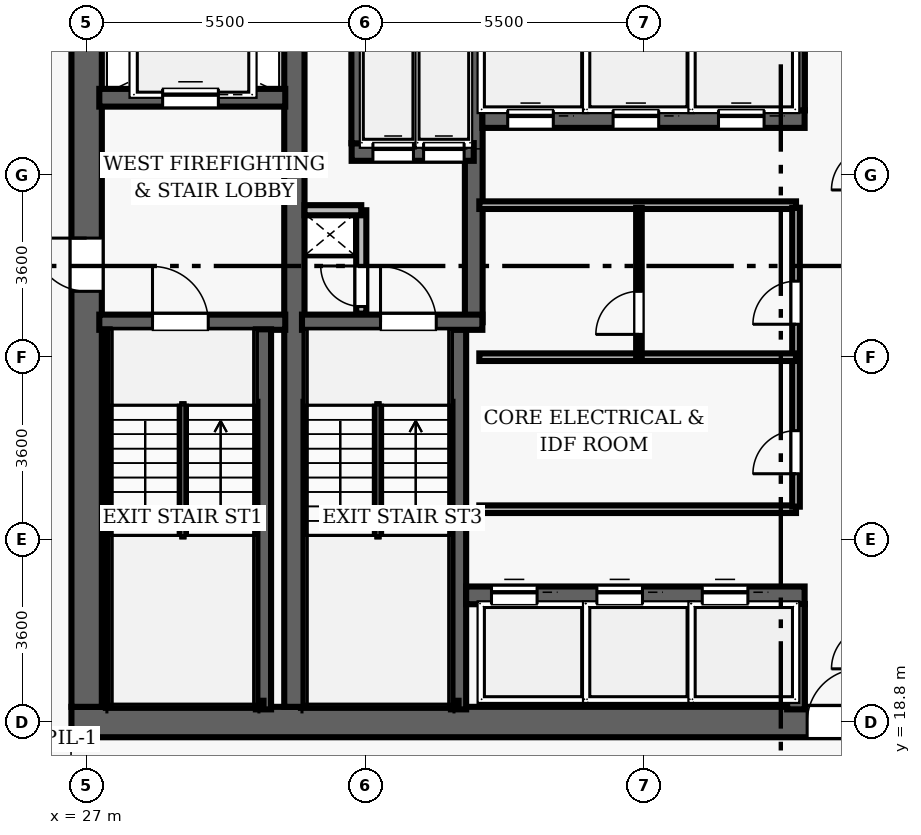
"""IFC4 building model, lengths in metres.
Left out: names, types, materials, properties, quantities, classifications, styles, units other than length and angle.
Written with IfcOpenShell. Run it as: python <this file> out.ifc"""

import sys

from ifc_helpers import new_model, si_unit, direction, frame, frame_2d, origin, place, context, subcontext, project, spatial, rectangle, extrude, element, fill, save


model = new_model("IFC4")
c1 = context("Model", 3, precision=1e-05, world=origin(), true_north=direction((0.0, 1.0)))
c2 = subcontext(c1, "Body", "Model", "MODEL_VIEW")
j1 = project(units=[si_unit("LENGTHUNIT", "METRE"), si_unit("PLANEANGLEUNIT", "RADIAN")], contexts=[c1])
p1 = place(None, origin())
s1 = spatial("IfcSite", under=j1, at=p1, CompositionType="ELEMENT")
p2 = place(p1, origin())
s2 = spatial("IfcBuilding", under=s1, at=p2, CompositionType="ELEMENT")
p3 = place(p2, origin())
s3 = spatial("IfcBuildingStorey", under=s2, at=p3, CompositionType="ELEMENT", Elevation=0.0)
p4 = place(p3, frame((26.7, 18.8, 0.0), z_axis=(0.0, 0.0, 1.0), x_axis=(1.0, 0.0, 0.0)))
e1 = element("IfcWall", 1, at=p4, inside=s3, PredefinedType="SHEAR", context=c2, shape_type="SweptSolid", body=[
    extrude(rectangle(XDim=22.6, YDim=0.6, at=frame_2d((11.3, 0.0))), origin(), (0.0, 0.0, 1.0), 6.6),
])
p5 = place(p4, frame((14.52, 0.0, 0.0)))
e2 = element("IfcOpeningElement", 2, at=p5, cuts=e1, PredefinedType="OPENING", context=c2, shape_type="SweptSolid", body=[
    extrude(rectangle(XDim=1.05, YDim=2.15, at=frame_2d((0.525, 1.075))), frame((0.0, 0.31, 0.0), z_axis=(0.0, -1.0, 0.0), x_axis=(1.0, 0.0, 0.0)), (0.0, 0.0, 1.0), 0.62),
])
p6 = place(p3, frame((27.0, 19.1, 0.0), z_axis=(0.0, 0.0, 1.0), x_axis=(0.0, 1.0, 0.0)))
e3 = element("IfcWall", 3, at=p6, inside=s3, PredefinedType="SHEAR", context=c2, shape_type="SweptSolid", body=[
    extrude(rectangle(XDim=13.8, YDim=0.6, at=frame_2d((6.9, 0.0))), origin(), (0.0, 0.0, 1.0), 6.6),
])
p7 = place(p6, frame((8.2, 0.0, 0.0)))
e4 = element("IfcOpeningElement", 4, at=p7, cuts=e3, PredefinedType="OPENING", context=c2, shape_type="SweptSolid", body=[
    extrude(rectangle(XDim=1.05, YDim=2.15, at=frame_2d((0.525, 1.075))), frame((0.0, 0.31, 0.0), z_axis=(0.0, -1.0, 0.0), x_axis=(1.0, 0.0, 0.0)), (0.0, 0.0, 1.0), 0.62),
])
p8 = place(p3, frame((31.1, 19.1, 0.0), z_axis=(0.0, 0.0, 1.0), x_axis=(0.0, 1.0, 0.0)))
e5 = element("IfcWall", 5, at=p8, inside=s3, PredefinedType="SHEAR", context=c2, shape_type="SweptSolid", body=[
    extrude(rectangle(XDim=13.8, YDim=0.4, at=frame_2d((6.9, 0.0))), origin(), (0.0, 0.0, 1.0), 6.6),
])
p9 = place(p3, frame((27.25, 26.69, 0.0), z_axis=(0.0, 0.0, 1.0), x_axis=(1.0, 0.0, 0.0)))
e6 = element("IfcWall", 6, at=p9, inside=s3, PredefinedType="SHEAR", context=c2, shape_type="SweptSolid", body=[
    extrude(rectangle(XDim=3.67, YDim=0.3, at=frame_2d((1.835, 0.0))), origin(), (0.0, 0.0, 1.0), 6.6),
])
p10 = place(p9, frame((1.05, 0.0, 0.0)))
e7 = element("IfcOpeningElement", 7, at=p10, cuts=e6, PredefinedType="OPENING", context=c2, shape_type="SweptSolid", body=[
    extrude(rectangle(XDim=1.1, YDim=2.15, at=frame_2d((0.55, 1.075))), frame((0.0, 0.16, 0.0), z_axis=(0.0, -1.0, 0.0), x_axis=(1.0, 0.0, 0.0)), (0.0, 0.0, 1.0), 0.32),
])
p11 = place(p3, frame((30.49, 19.05, 0.0), z_axis=(0.0, 0.0, 1.0), x_axis=(0.0, 1.0, 0.0)))
e8 = element("IfcWall", 8, at=p11, inside=s3, PredefinedType="SHEAR", context=c2, shape_type="SweptSolid", body=[
    extrude(rectangle(XDim=7.5, YDim=0.3, at=frame_2d((3.75, 0.0))), origin(), (0.0, 0.0, 1.0), 6.6),
])
p12 = place(p3, frame((27.395, 19.1, 0.0), z_axis=(0.0, 0.0, 1.0), x_axis=(0.0, 1.0, 0.0)))
e9 = element("IfcWall", 9, at=p12, inside=s3, PredefinedType="SHEAR", context=c2, shape_type="SweptSolid", body=[
    extrude(rectangle(XDim=7.45, YDim=0.12, at=frame_2d((3.725, 0.0))), origin(), (0.0, 0.0, 1.0), 6.6),
])
p13 = place(p3, frame((27.395, 19.16, 0.0), z_axis=(0.0, 0.0, 1.0), x_axis=(1.0, 0.0, 0.0)))
e10 = element("IfcWall", 10, at=p13, inside=s3, PredefinedType="SHEAR", context=c2, shape_type="SweptSolid", body=[
    extrude(rectangle(XDim=3.095, YDim=0.12, at=frame_2d((1.547, 0.0))), origin(), (0.0, 0.0, 1.0), 6.6),
])
p14 = place(p3, frame((27.25, 31.12, 0.0), z_axis=(0.0, 0.0, 1.0), x_axis=(1.0, 0.0, 0.0)))
e11 = element("IfcWall", 11, at=p14, inside=s3, PredefinedType="SHEAR", context=c2, shape_type="SweptSolid", body=[
    extrude(rectangle(XDim=3.67, YDim=0.35, at=frame_2d((1.835, 0.0))), origin(), (0.0, 0.0, 1.0), 5.31),
])
p15 = place(p14, frame((1.25, 0.0, 0.0)))
e12 = element("IfcOpeningElement", 12, at=p15, cuts=e11, PredefinedType="OPENING", context=c2, shape_type="SweptSolid", body=[
    extrude(rectangle(XDim=1.1, YDim=2.15, at=frame_2d((0.55, 1.075))), frame((0.0, 0.185, 0.0), z_axis=(0.0, -1.0, 0.0), x_axis=(1.0, 0.0, 0.0)), (0.0, 0.0, 1.0), 0.37),
])
p16 = place(p3, frame((34.34, 19.05, 0.0), z_axis=(0.0, 0.0, 1.0), x_axis=(0.0, 1.0, 0.0)))
e13 = element("IfcWall", 13, at=p16, inside=s3, PredefinedType="SHEAR", context=c2, shape_type="SweptSolid", body=[
    extrude(rectangle(XDim=7.5, YDim=0.3, at=frame_2d((3.75, 0.0))), origin(), (0.0, 0.0, 1.0), 6.6),
])
p17 = place(p3, frame((34.64, 26.69, 0.0), z_axis=(0.0, 0.0, 1.0), x_axis=(0.0, 1.0, 0.0)))
e14 = element("IfcWall", 14, at=p17, inside=s3, PredefinedType="SHEAR", context=c2, shape_type="SweptSolid", body=[
    extrude(rectangle(XDim=6.26, YDim=0.35, at=frame_2d((3.13, 0.0))), origin(), (0.0, 0.0, 1.0), 6.6),
])
p18 = place(p3, frame((31.25, 26.69, 0.0), z_axis=(0.0, 0.0, 1.0), x_axis=(1.0, 0.0, 0.0)))
e15 = element("IfcWall", 15, at=p18, inside=s3, PredefinedType="SHEAR", context=c2, shape_type="SweptSolid", body=[
    extrude(rectangle(XDim=3.56, YDim=0.3, at=frame_2d((1.78, 0.0))), origin(), (0.0, 0.0, 1.0), 6.6),
])
p19 = place(p18, frame((1.55, 0.0, 0.0)))
e16 = element("IfcOpeningElement", 16, at=p19, cuts=e15, PredefinedType="OPENING", context=c2, shape_type="SweptSolid", body=[
    extrude(rectangle(XDim=1.1, YDim=2.15, at=frame_2d((0.55, 1.075))), frame((0.0, 0.16, 0.0), z_axis=(0.0, -1.0, 0.0), x_axis=(1.0, 0.0, 0.0)), (0.0, 0.0, 1.0), 0.32),
])
p20 = place(p3, frame((31.3, 19.16, 0.0), z_axis=(0.0, 0.0, 1.0), x_axis=(1.0, 0.0, 0.0)))
e17 = element("IfcWall", 17, at=p20, inside=s3, PredefinedType="SHEAR", context=c2, shape_type="SweptSolid", body=[
    extrude(rectangle(XDim=3.04, YDim=0.12, at=frame_2d((1.52, 0.0))), origin(), (0.0, 0.0, 1.0), 6.6),
])
p21 = place(p3, frame((32.23, 30.05, 0.0), z_axis=(0.0, 0.0, 1.0), x_axis=(1.0, 0.0, 0.0)))
e18 = element("IfcWall", 18, at=p21, inside=s3, PredefinedType="SHEAR", context=c2, shape_type="SweptSolid", body=[
    extrude(rectangle(XDim=2.41, YDim=0.35, at=frame_2d((1.205, 0.0))), origin(), (0.0, 0.0, 1.0), 5.31),
])
p22 = place(p21, frame((0.42, 0.0, 0.0)))
e19 = element("IfcOpeningElement", 19, at=p22, cuts=e18, PredefinedType="OPENING", context=c2, shape_type="SweptSolid", body=[
    extrude(rectangle(XDim=0.8, YDim=2.15, at=frame_2d((0.4, 1.075))), frame((0.0, 0.185, 0.0), z_axis=(0.0, -1.0, 0.0), x_axis=(1.0, 0.0, 0.0)), (0.0, 0.0, 1.0), 0.37),
])
p23 = place(p21, frame((1.42, 0.0, 0.0)))
e20 = element("IfcOpeningElement", 20, at=p23, cuts=e18, PredefinedType="OPENING", context=c2, shape_type="SweptSolid", body=[
    extrude(rectangle(XDim=0.8, YDim=2.15, at=frame_2d((0.4, 1.075))), frame((0.0, 0.185, 0.0), z_axis=(0.0, -1.0, 0.0), x_axis=(1.0, 0.0, 0.0)), (0.0, 0.0, 1.0), 0.37),
])
p24 = place(p3, frame((32.4, 30.22, 0.0), z_axis=(0.0, 0.0, 1.0), x_axis=(0.0, 1.0, 0.0)))
e21 = element("IfcWall", 21, at=p24, inside=s3, PredefinedType="SHEAR", context=c2, shape_type="SweptSolid", body=[
    extrude(rectangle(XDim=2.73, YDim=0.35, at=frame_2d((1.365, 0.0))), origin(), (0.0, 0.0, 1.0), 5.31),
])
p25 = place(p3, frame((32.42, 26.86, 0.0), z_axis=(0.0, 0.0, 1.0), x_axis=(0.0, 1.0, 0.0)))
e22 = element("IfcWall", 22, at=p25, inside=s3, PredefinedType="PARTITIONING", context=c2, shape_type="SweptSolid", body=[
    extrude(rectangle(XDim=2.04, YDim=0.2, at=frame_2d((1.02, 0.0))), origin(), (0.0, 0.0, 1.0), 5.31),
])
p26 = place(p25, frame((0.14, 0.0, 0.0)))
e23 = element("IfcOpeningElement", 23, at=p26, cuts=e22, PredefinedType="OPENING", context=c2, shape_type="SweptSolid", body=[
    extrude(rectangle(XDim=0.8, YDim=2.05, at=frame_2d((0.4, 1.025))), frame((0.0, 0.11, 0.0), z_axis=(0.0, -1.0, 0.0), x_axis=(1.0, 0.0, 0.0)), (0.0, 0.0, 1.0), 0.22),
])
p27 = place(p3, frame((31.3, 28.9, 0.0), z_axis=(0.0, 0.0, 1.0), x_axis=(1.0, 0.0, 0.0)))
e24 = element("IfcWall", 24, at=p27, inside=s3, PredefinedType="PARTITIONING", context=c2, shape_type="SweptSolid", body=[
    extrude(rectangle(XDim=1.12, YDim=0.2, at=frame_2d((0.56, 0.0))), origin(), (0.0, 0.0, 1.0), 5.31),
])
p28 = place(p3, frame((34.81, 30.7, 0.0), z_axis=(0.0, 0.0, 1.0), x_axis=(1.0, 0.0, 0.0)))
e25 = element("IfcWall", 25, at=p28, inside=s3, PredefinedType="SHEAR", context=c2, shape_type="SweptSolid", body=[
    extrude(rectangle(XDim=6.36, YDim=0.35, at=frame_2d((3.18, 0.0))), origin(), (0.0, 0.0, 1.0), 5.31),
])
p29 = place(p28, frame((0.5, 0.0, 0.0)))
e26 = element("IfcOpeningElement", 26, at=p29, cuts=e25, PredefinedType="OPENING", context=c2, shape_type="SweptSolid", body=[
    extrude(rectangle(XDim=0.9, YDim=2.15, at=frame_2d((0.45, 1.075))), frame((0.0, 0.185, 0.0), z_axis=(0.0, -1.0, 0.0), x_axis=(1.0, 0.0, 0.0)), (0.0, 0.0, 1.0), 0.37),
])
p30 = place(p28, frame((2.58, 0.0, 0.0)))
e27 = element("IfcOpeningElement", 27, at=p30, cuts=e25, PredefinedType="OPENING", context=c2, shape_type="SweptSolid", body=[
    extrude(rectangle(XDim=0.9, YDim=2.15, at=frame_2d((0.45, 1.075))), frame((0.0, 0.185, 0.0), z_axis=(0.0, -1.0, 0.0), x_axis=(1.0, 0.0, 0.0)), (0.0, 0.0, 1.0), 0.37),
])
p31 = place(p28, frame((4.66, 0.0, 0.0)))
e28 = element("IfcOpeningElement", 28, at=p31, cuts=e25, PredefinedType="OPENING", context=c2, shape_type="SweptSolid", body=[
    extrude(rectangle(XDim=0.9, YDim=2.15, at=frame_2d((0.45, 1.075))), frame((0.0, 0.185, 0.0), z_axis=(0.0, -1.0, 0.0), x_axis=(1.0, 0.0, 0.0)), (0.0, 0.0, 1.0), 0.37),
])
p32 = place(p3, frame((41.0, 30.87, 0.0), z_axis=(0.0, 0.0, 1.0), x_axis=(0.0, 1.0, 0.0)))
e29 = element("IfcWall", 29, at=p32, inside=s3, PredefinedType="SHEAR", context=c2, shape_type="SweptSolid", body=[
    extrude(rectangle(XDim=2.08, YDim=0.35, at=frame_2d((1.04, 0.0))), origin(), (0.0, 0.0, 1.0), 5.31),
])
p33 = place(p3, frame((34.49, 21.3, 0.0), z_axis=(0.0, 0.0, 1.0), x_axis=(1.0, 0.0, 0.0)))
e30 = element("IfcWall", 30, at=p33, inside=s3, PredefinedType="SHEAR", context=c2, shape_type="SweptSolid", body=[
    extrude(rectangle(XDim=6.68, YDim=0.35, at=frame_2d((3.34, 0.0))), origin(), (0.0, 0.0, 1.0), 5.31),
])
p34 = place(p33, frame((0.5, 0.0, 0.0)))
e31 = element("IfcOpeningElement", 31, at=p34, cuts=e30, PredefinedType="OPENING", context=c2, shape_type="SweptSolid", body=[
    extrude(rectangle(XDim=0.9, YDim=2.15, at=frame_2d((0.45, 1.075))), frame((0.0, 0.185, 0.0), z_axis=(0.0, -1.0, 0.0), x_axis=(1.0, 0.0, 0.0)), (0.0, 0.0, 1.0), 0.37),
])
p35 = place(p33, frame((2.58, 0.0, 0.0)))
e32 = element("IfcOpeningElement", 32, at=p35, cuts=e30, PredefinedType="OPENING", context=c2, shape_type="SweptSolid", body=[
    extrude(rectangle(XDim=0.9, YDim=2.15, at=frame_2d((0.45, 1.075))), frame((0.0, 0.185, 0.0), z_axis=(0.0, -1.0, 0.0), x_axis=(1.0, 0.0, 0.0)), (0.0, 0.0, 1.0), 0.37),
])
p36 = place(p33, frame((4.66, 0.0, 0.0)))
e33 = element("IfcOpeningElement", 33, at=p36, cuts=e30, PredefinedType="OPENING", context=c2, shape_type="SweptSolid", body=[
    extrude(rectangle(XDim=0.9, YDim=2.15, at=frame_2d((0.45, 1.075))), frame((0.0, 0.185, 0.0), z_axis=(0.0, -1.0, 0.0), x_axis=(1.0, 0.0, 0.0)), (0.0, 0.0, 1.0), 0.37),
])
p37 = place(p3, frame((41.0, 19.05, 0.0), z_axis=(0.0, 0.0, 1.0), x_axis=(0.0, 1.0, 0.0)))
e34 = element("IfcWall", 34, at=p37, inside=s3, PredefinedType="SHEAR", context=c2, shape_type="SweptSolid", body=[
    extrude(rectangle(XDim=2.08, YDim=0.35, at=frame_2d((1.04, 0.0))), origin(), (0.0, 0.0, 1.0), 5.31),
])
for number, where, z_axis, x_axis in (
    (35, (34.75, 29.0, 0.0), (0.0, 0.0, 1.0), (1.0, 0.0, 0.0)),
    (36, (34.75, 23.0, 0.0), (0.0, 0.0, 1.0), (1.0, 0.0, 0.0)),
):
    element("IfcWall", number, at=place(p3, frame(where, z_axis=z_axis, x_axis=x_axis)), inside=s3, PredefinedType="PARTITIONING", context=c2, shape_type="SweptSolid", body=[
        extrude(rectangle(XDim=6.25, YDim=0.15, at=frame_2d((3.125, 0.0))), origin(), (0.0, 0.0, 1.0), 5.31),
    ])
p38 = place(p3, frame((41.0, 23.05, 0.0), z_axis=(0.0, 0.0, 1.0), x_axis=(0.0, 1.0, 0.0)))
e37 = element("IfcWall", 37, at=p38, inside=s3, PredefinedType="PARTITIONING", context=c2, shape_type="SweptSolid", body=[
    extrude(rectangle(XDim=5.9, YDim=0.15, at=frame_2d((2.95, 0.0))), origin(), (0.0, 0.0, 1.0), 5.31),
])
p39 = place(p38, frame((0.65, 0.0, 0.0)))
e38 = element("IfcOpeningElement", 38, at=p39, cuts=e37, PredefinedType="OPENING", context=c2, shape_type="SweptSolid", body=[
    extrude(rectangle(XDim=0.85, YDim=2.1, at=frame_2d((0.425, 1.05))), frame((0.0, 0.085, 0.0), z_axis=(0.0, -1.0, 0.0), x_axis=(1.0, 0.0, 0.0)), (0.0, 0.0, 1.0), 0.17),
])
p40 = place(p38, frame((3.6, 0.0, 0.0)))
e39 = element("IfcOpeningElement", 39, at=p40, cuts=e37, PredefinedType="OPENING", context=c2, shape_type="SweptSolid", body=[
    extrude(rectangle(XDim=0.85, YDim=2.1, at=frame_2d((0.425, 1.05))), frame((0.0, 0.085, 0.0), z_axis=(0.0, -1.0, 0.0), x_axis=(1.0, 0.0, 0.0)), (0.0, 0.0, 1.0), 0.17),
])
p41 = place(p3, frame((34.75, 26.0, 0.0), z_axis=(0.0, 0.0, 1.0), x_axis=(1.0, 0.0, 0.0)))
e40 = element("IfcWall", 40, at=p41, inside=s3, PredefinedType="PARTITIONING", context=c2, shape_type="SweptSolid", body=[
    extrude(rectangle(XDim=6.25, YDim=0.15, at=frame_2d((3.125, 0.0))), origin(), (0.0, 0.0, 1.0), 5.31),
])
p42 = place(p3, frame((37.9, 26.0, 0.0), z_axis=(0.0, 0.0, 1.0), x_axis=(0.0, 1.0, 0.0)))
e41 = element("IfcWall", 41, at=p42, inside=s3, PredefinedType="PARTITIONING", context=c2, shape_type="SweptSolid", body=[
    extrude(rectangle(XDim=2.95, YDim=0.11, at=frame_2d((1.475, 0.0))), origin(), (0.0, 0.0, 1.0), 5.31),
])
p43 = place(p42, frame((0.45, 0.0, 0.0)))
e42 = element("IfcOpeningElement", 42, at=p43, cuts=e41, PredefinedType="OPENING", context=c2, shape_type="SweptSolid", body=[
    extrude(rectangle(XDim=0.85, YDim=2.1, at=frame_2d((0.425, 1.05))), frame((0.0, 0.065, 0.0), z_axis=(0.0, -1.0, 0.0), x_axis=(1.0, 0.0, 0.0)), (0.0, 0.0, 1.0), 0.13),
])
p44 = place(p10, origin())
e43 = element("IfcDoor", 43, at=p44, inside=s3, OperationType="SINGLE_SWING_LEFT", PredefinedType="DOOR", context=c2, shape_type="SweptSolid", body=[
    extrude(rectangle(XDim=1.1, YDim=2.15, at=frame_2d((0.55, 1.075))), frame((0.0, 0.025, 0.0), z_axis=(0.0, -1.0, 0.0), x_axis=(1.0, 0.0, 0.0)), (0.0, 0.0, 1.0), 0.05),
])
fill(e7, e43)
p45 = place(p7, origin())
e44 = element("IfcDoor", 44, at=p45, inside=s3, OperationType="SINGLE_SWING_RIGHT", PredefinedType="DOOR", context=c2, shape_type="SweptSolid", body=[
    extrude(rectangle(XDim=1.05, YDim=2.15, at=frame_2d((0.525, 1.075))), frame((0.0, 0.025, 0.0), z_axis=(0.0, -1.0, 0.0), x_axis=(1.0, 0.0, 0.0)), (0.0, 0.0, 1.0), 0.05),
])
fill(e4, e44)
p46 = place(p19, origin())
e45 = element("IfcDoor", 45, at=p46, inside=s3, OperationType="SINGLE_SWING_LEFT", PredefinedType="DOOR", context=c2, shape_type="SweptSolid", body=[
    extrude(rectangle(XDim=1.1, YDim=2.15, at=frame_2d((0.55, 1.075))), frame((0.0, 0.025, 0.0), z_axis=(0.0, -1.0, 0.0), x_axis=(1.0, 0.0, 0.0)), (0.0, 0.0, 1.0), 0.05),
])
fill(e16, e45)
p47 = place(p26, origin())
e46 = element("IfcDoor", 46, at=p47, inside=s3, OperationType="SINGLE_SWING_RIGHT", PredefinedType="DOOR", context=c2, shape_type="SweptSolid", body=[
    extrude(rectangle(XDim=0.8, YDim=2.05, at=frame_2d((0.4, 1.025))), frame((0.0, 0.025, 0.0), z_axis=(0.0, -1.0, 0.0), x_axis=(1.0, 0.0, 0.0)), (0.0, 0.0, 1.0), 0.05),
])
fill(e23, e46)
p48 = place(p5, origin())
e47 = element("IfcDoor", 47, at=p48, inside=s3, OperationType="SINGLE_SWING_RIGHT", PredefinedType="DOOR", context=c2, shape_type="SweptSolid", body=[
    extrude(rectangle(XDim=1.05, YDim=2.15, at=frame_2d((0.525, 1.075))), frame((0.0, 0.025, 0.0), z_axis=(0.0, -1.0, 0.0), x_axis=(1.0, 0.0, 0.0)), (0.0, 0.0, 1.0), 0.05),
])
fill(e2, e47)
p49 = place(p39, origin())
e48 = element("IfcDoor", 48, at=p49, inside=s3, OperationType="SINGLE_SWING_LEFT", PredefinedType="DOOR", context=c2, shape_type="SweptSolid", body=[
    extrude(rectangle(XDim=0.85, YDim=2.1, at=frame_2d((0.425, 1.05))), frame((0.0, 0.025, 0.0), z_axis=(0.0, -1.0, 0.0), x_axis=(1.0, 0.0, 0.0)), (0.0, 0.0, 1.0), 0.05),
])
fill(e38, e48)
p50 = place(p40, origin())
e49 = element("IfcDoor", 49, at=p50, inside=s3, OperationType="SINGLE_SWING_LEFT", PredefinedType="DOOR", context=c2, shape_type="SweptSolid", body=[
    extrude(rectangle(XDim=0.85, YDim=2.1, at=frame_2d((0.425, 1.05))), frame((0.0, 0.025, 0.0), z_axis=(0.0, -1.0, 0.0), x_axis=(1.0, 0.0, 0.0)), (0.0, 0.0, 1.0), 0.05),
])
fill(e39, e49)
p51 = place(p43, origin())
e50 = element("IfcDoor", 50, at=p51, inside=s3, OperationType="SINGLE_SWING_LEFT", PredefinedType="DOOR", context=c2, shape_type="SweptSolid", body=[
    extrude(rectangle(XDim=0.85, YDim=2.1, at=frame_2d((0.425, 1.05))), frame((0.0, 0.025, 0.0), z_axis=(0.0, -1.0, 0.0), x_axis=(1.0, 0.0, 0.0)), (0.0, 0.0, 1.0), 0.05),
])
fill(e42, e50)
p52 = place(p29, origin())
e51 = element("IfcDoor", 51, at=p52, inside=s3, OperationType="SLIDING_TO_LEFT", PredefinedType="DOOR", context=c2, shape_type="SweptSolid", body=[
    extrude(rectangle(XDim=0.9, YDim=2.15, at=frame_2d((0.45, 1.075))), frame((0.0, 0.025, 0.0), z_axis=(0.0, -1.0, 0.0), x_axis=(1.0, 0.0, 0.0)), (0.0, 0.0, 1.0), 0.05),
])
fill(e26, e51)
p53 = place(p30, origin())
e52 = element("IfcDoor", 52, at=p53, inside=s3, OperationType="SLIDING_TO_LEFT", PredefinedType="DOOR", context=c2, shape_type="SweptSolid", body=[
    extrude(rectangle(XDim=0.9, YDim=2.15, at=frame_2d((0.45, 1.075))), frame((0.0, 0.025, 0.0), z_axis=(0.0, -1.0, 0.0), x_axis=(1.0, 0.0, 0.0)), (0.0, 0.0, 1.0), 0.05),
])
fill(e27, e52)
p54 = place(p31, origin())
e53 = element("IfcDoor", 53, at=p54, inside=s3, OperationType="SLIDING_TO_LEFT", PredefinedType="DOOR", context=c2, shape_type="SweptSolid", body=[
    extrude(rectangle(XDim=0.9, YDim=2.15, at=frame_2d((0.45, 1.075))), frame((0.0, 0.025, 0.0), z_axis=(0.0, -1.0, 0.0), x_axis=(1.0, 0.0, 0.0)), (0.0, 0.0, 1.0), 0.05),
])
fill(e28, e53)
p55 = place(p34, origin())
e54 = element("IfcDoor", 54, at=p55, inside=s3, OperationType="SLIDING_TO_LEFT", PredefinedType="DOOR", context=c2, shape_type="SweptSolid", body=[
    extrude(rectangle(XDim=0.9, YDim=2.15, at=frame_2d((0.45, 1.075))), frame((0.0, 0.025, 0.0), z_axis=(0.0, -1.0, 0.0), x_axis=(1.0, 0.0, 0.0)), (0.0, 0.0, 1.0), 0.05),
])
fill(e31, e54)
p56 = place(p35, origin())
e55 = element("IfcDoor", 55, at=p56, inside=s3, OperationType="SLIDING_TO_LEFT", PredefinedType="DOOR", context=c2, shape_type="SweptSolid", body=[
    extrude(rectangle(XDim=0.9, YDim=2.15, at=frame_2d((0.45, 1.075))), frame((0.0, 0.025, 0.0), z_axis=(0.0, -1.0, 0.0), x_axis=(1.0, 0.0, 0.0)), (0.0, 0.0, 1.0), 0.05),
])
fill(e32, e55)
p57 = place(p36, origin())
e56 = element("IfcDoor", 56, at=p57, inside=s3, OperationType="SLIDING_TO_LEFT", PredefinedType="DOOR", context=c2, shape_type="SweptSolid", body=[
    extrude(rectangle(XDim=0.9, YDim=2.15, at=frame_2d((0.45, 1.075))), frame((0.0, 0.025, 0.0), z_axis=(0.0, -1.0, 0.0), x_axis=(1.0, 0.0, 0.0)), (0.0, 0.0, 1.0), 0.05),
])
fill(e33, e56)
p58 = place(p15, origin())
e57 = element("IfcDoor", 57, at=p58, inside=s3, OperationType="SLIDING_TO_LEFT", PredefinedType="DOOR", context=c2, shape_type="SweptSolid", body=[
    extrude(rectangle(XDim=1.1, YDim=2.15, at=frame_2d((0.55, 1.075))), frame((0.0, 0.025, 0.0), z_axis=(0.0, -1.0, 0.0), x_axis=(1.0, 0.0, 0.0)), (0.0, 0.0, 1.0), 0.05),
])
fill(e12, e57)
p59 = place(p22, origin())
e58 = element("IfcDoor", 58, at=p59, inside=s3, OperationType="SLIDING_TO_LEFT", PredefinedType="DOOR", context=c2, shape_type="SweptSolid", body=[
    extrude(rectangle(XDim=0.8, YDim=2.15, at=frame_2d((0.4, 1.075))), frame((0.0, 0.025, 0.0), z_axis=(0.0, -1.0, 0.0), x_axis=(1.0, 0.0, 0.0)), (0.0, 0.0, 1.0), 0.05),
])
fill(e19, e58)
p60 = place(p23, origin())
e59 = element("IfcDoor", 59, at=p60, inside=s3, OperationType="SLIDING_TO_LEFT", PredefinedType="DOOR", context=c2, shape_type="SweptSolid", body=[
    extrude(rectangle(XDim=0.8, YDim=2.15, at=frame_2d((0.4, 1.075))), frame((0.0, 0.025, 0.0), z_axis=(0.0, -1.0, 0.0), x_axis=(1.0, 0.0, 0.0)), (0.0, 0.0, 1.0), 0.05),
])
fill(e20, e59)
save(model, sys.argv[1])
